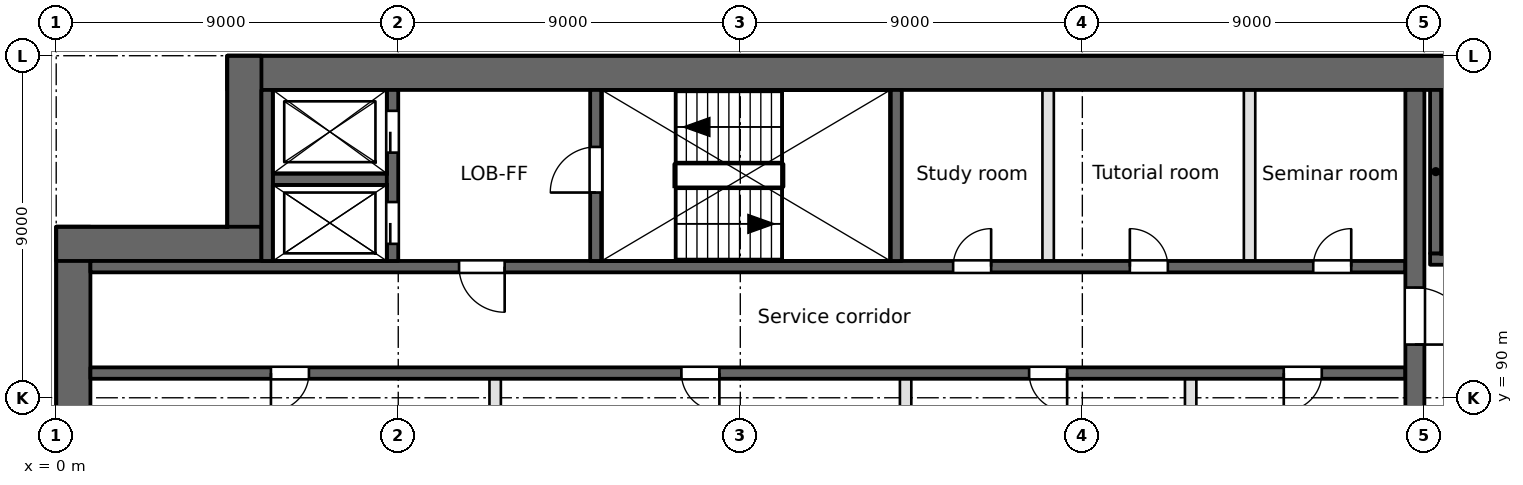
"""IFC4 building model, lengths in metres.
Left out: names, types, materials, properties, quantities, classifications, styles, units other than length and angle.
Written with IfcOpenShell. Run it as: python <this file> out.ifc"""

import sys

from ifc_helpers import new_model, si_unit, direction, frame, frame_2d, origin, place, context, subcontext, project, spatial, rectangle, extrude, element, fill, save


model = new_model("IFC4")
c1 = context("Model", 3, precision=1e-05, world=origin(), true_north=direction((0.0, 1.0)))
c2 = subcontext(c1, "Body", "Model", "MODEL_VIEW")
j1 = project(units=[si_unit("LENGTHUNIT", "METRE"), si_unit("PLANEANGLEUNIT", "RADIAN")], contexts=[c1])
p1 = place(None, origin())
s1 = spatial("IfcSite", under=j1, at=p1, CompositionType="ELEMENT")
p2 = place(p1, origin())
s2 = spatial("IfcBuilding", under=s1, at=p2, CompositionType="ELEMENT")
p3 = place(p2, frame((0.0, 0.0, 58.0)))
s3 = spatial("IfcBuildingStorey", under=s2, at=p3, CompositionType="ELEMENT", Elevation=58.0)
p4 = place(p3, frame((0.45, 94.5, 0.0), z_axis=(0.0, 0.0, 1.0), x_axis=(0.0, -1.0, 0.0)))
e1 = element("IfcWall", 1, at=p4, inside=s3, PredefinedType="SHEAR", context=c2, shape_type="SweptSolid", body=[
    extrude(rectangle(XDim=66.187, YDim=0.9, at=frame_2d((33.094, 0.0))), origin(), (0.0, 0.0, 1.0), 3.7),
])
p5 = place(p3, frame((94.5, 98.55, 0.0), z_axis=(0.0, 0.0, 1.0), x_axis=(-1.0, 0.0, 0.0)))
e2 = element("IfcWall", 2, at=p5, inside=s3, PredefinedType="SHEAR", context=c2, shape_type="SweptSolid", body=[
    extrude(rectangle(XDim=90.0, YDim=0.9, at=frame_2d((45.0, 0.0))), origin(), (0.0, 0.0, 1.0), 3.7),
])
for number, where, z_axis, x_axis in (
    (3, (4.95, 99.0, 0.0), (0.0, 0.0, 1.0), (0.0, -1.0, 0.0)),
    (4, (5.4, 94.05, 0.0), (0.0, 0.0, 1.0), (-1.0, 0.0, 0.0)),
):
    element("IfcWall", number, at=place(p3, frame(where, z_axis=z_axis, x_axis=x_axis)), inside=s3, PredefinedType="SHEAR", context=c2, shape_type="SweptSolid", body=[
        extrude(rectangle(XDim=5.4, YDim=0.9, at=frame_2d((2.7, 0.0))), origin(), (0.0, 0.0, 1.0), 3.7),
    ])
p6 = place(p3, frame((0.9, 90.65, -0.4), z_axis=(0.0, 0.0, 1.0), x_axis=(1.0, 0.0, 0.0)))
e5 = element("IfcWall", 5, at=p6, inside=s3, PredefinedType="SOLIDWALL", context=c2, shape_type="SweptSolid", body=[
    extrude(rectangle(XDim=34.6, YDim=0.3, at=frame_2d((17.3, 0.0))), origin(), (0.0, 0.0, 1.0), 3.7),
])
p7 = place(p6, frame((4.75, 0.0, 0.4)))
e6 = element("IfcOpeningElement", 6, at=p7, cuts=e5, PredefinedType="OPENING", context=c2, shape_type="SweptSolid", body=[
    extrude(rectangle(XDim=1.0, YDim=2.1, at=frame_2d((0.5, 1.05))), frame((0.0, 0.15, 0.0), z_axis=(0.0, -1.0, 0.0), x_axis=(1.0, 0.0, 0.0)), (0.0, 0.0, 1.0), 0.3),
])
p8 = place(p6, frame((24.7, 0.0, 0.4)))
e7 = element("IfcOpeningElement", 7, at=p8, cuts=e5, PredefinedType="OPENING", context=c2, shape_type="SweptSolid", body=[
    extrude(rectangle(XDim=1.0, YDim=2.1, at=frame_2d((0.5, 1.05))), frame((0.0, 0.15, 0.0), z_axis=(0.0, -1.0, 0.0), x_axis=(1.0, 0.0, 0.0)), (0.0, 0.0, 1.0), 0.3),
])
p9 = place(p6, frame((15.55, 0.0, 0.4)))
e8 = element("IfcOpeningElement", 8, at=p9, cuts=e5, PredefinedType="OPENING", context=c2, shape_type="SweptSolid", body=[
    extrude(rectangle(XDim=1.0, YDim=2.1, at=frame_2d((0.5, 1.05))), frame((0.0, 0.15, 0.0), z_axis=(0.0, -1.0, 0.0), x_axis=(1.0, 0.0, 0.0)), (0.0, 0.0, 1.0), 0.3),
])
p10 = place(p6, frame((31.4, 0.0, 0.4)))
e9 = element("IfcOpeningElement", 9, at=p10, cuts=e5, PredefinedType="OPENING", context=c2, shape_type="SweptSolid", body=[
    extrude(rectangle(XDim=1.0, YDim=2.1, at=frame_2d((0.5, 1.05))), frame((0.0, 0.15, 0.0), z_axis=(0.0, -1.0, 0.0), x_axis=(1.0, 0.0, 0.0)), (0.0, 0.0, 1.0), 0.3),
])
p11 = place(p3, frame((0.9, 93.45, -0.4), z_axis=(0.0, 0.0, 1.0), x_axis=(1.0, 0.0, 0.0)))
e10 = element("IfcWall", 10, at=p11, inside=s3, PredefinedType="SOLIDWALL", context=c2, shape_type="SweptSolid", body=[
    extrude(rectangle(XDim=34.6, YDim=0.3, at=frame_2d((17.3, 0.0))), origin(), (0.0, 0.0, 1.0), 3.7),
])
p12 = place(p11, frame((9.7, 0.0, 0.4)))
e11 = element("IfcOpeningElement", 11, at=p12, cuts=e10, PredefinedType="OPENING", context=c2, shape_type="SweptSolid", body=[
    extrude(rectangle(XDim=1.2, YDim=2.1, at=frame_2d((0.6, 1.05))), frame((0.0, 0.15, 0.0), z_axis=(0.0, -1.0, 0.0), x_axis=(1.0, 0.0, 0.0)), (0.0, 0.0, 1.0), 0.3),
])
p13 = place(p11, frame((22.7, 0.0, 0.4)))
e12 = element("IfcOpeningElement", 12, at=p13, cuts=e10, PredefinedType="OPENING", context=c2, shape_type="SweptSolid", body=[
    extrude(rectangle(XDim=1.0, YDim=2.1, at=frame_2d((0.5, 1.05))), frame((0.0, 0.15, 0.0), z_axis=(0.0, -1.0, 0.0), x_axis=(1.0, 0.0, 0.0)), (0.0, 0.0, 1.0), 0.3),
])
p14 = place(p11, frame((27.35, 0.0, 0.4)))
e13 = element("IfcOpeningElement", 13, at=p14, cuts=e10, PredefinedType="OPENING", context=c2, shape_type="SweptSolid", body=[
    extrude(rectangle(XDim=1.0, YDim=2.1, at=frame_2d((0.5, 1.05))), frame((0.0, 0.15, 0.0), z_axis=(0.0, -1.0, 0.0), x_axis=(1.0, 0.0, 0.0)), (0.0, 0.0, 1.0), 0.3),
])
p15 = place(p11, frame((32.175, 0.0, 0.4)))
e14 = element("IfcOpeningElement", 14, at=p15, cuts=e10, PredefinedType="OPENING", context=c2, shape_type="SweptSolid", body=[
    extrude(rectangle(XDim=1.0, YDim=2.1, at=frame_2d((0.5, 1.05))), frame((0.0, 0.15, 0.0), z_axis=(0.0, -1.0, 0.0), x_axis=(1.0, 0.0, 0.0)), (0.0, 0.0, 1.0), 0.3),
])
p16 = place(p3, frame((36.15, 93.65, -0.4), z_axis=(0.0, 0.0, 1.0), x_axis=(1.0, 0.0, 0.0)))
e15 = element("IfcWall", 15, at=p16, inside=s3, PredefinedType="SOLIDWALL", context=c2, shape_type="SweptSolid", body=[
    extrude(rectangle(XDim=8.2, YDim=0.3, at=frame_2d((4.1, 0.0))), origin(), (0.0, 0.0, 1.0), 3.7),
])
p17 = place(p16, frame((0.7, 0.0, 0.4)))
e16 = element("IfcOpeningElement", 16, at=p17, cuts=e15, PredefinedType="OPENING", context=c2, shape_type="SweptSolid", body=[
    extrude(rectangle(XDim=1.2, YDim=2.1, at=frame_2d((0.6, 1.05))), frame((0.0, 0.15, 0.0), z_axis=(0.0, -1.0, 0.0), x_axis=(1.0, 0.0, 0.0)), (0.0, 0.0, 1.0), 0.3),
])
p18 = place(p3, frame((5.7, 95.75, -0.4), z_axis=(0.0, 0.0, 1.0), x_axis=(1.0, 0.0, 0.0)))
e17 = element("IfcWall", 17, at=p18, inside=s3, PredefinedType="SOLIDWALL", context=c2, shape_type="SweptSolid", body=[
    extrude(rectangle(XDim=3.0, YDim=0.3, at=frame_2d((1.5, 0.0))), origin(), (0.0, 0.0, 1.0), 3.7),
])
p19 = place(p3, frame((5.55, 93.6, -0.4), z_axis=(0.0, 0.0, 1.0), x_axis=(0.0, 1.0, 0.0)))
e18 = element("IfcWall", 18, at=p19, inside=s3, PredefinedType="SOLIDWALL", context=c2, shape_type="SweptSolid", body=[
    extrude(rectangle(XDim=4.5, YDim=0.3, at=frame_2d((2.25, 0.0))), origin(), (0.0, 0.0, 1.0), 3.7),
])
p20 = place(p3, frame((8.85, 93.6, -0.4), z_axis=(0.0, 0.0, 1.0), x_axis=(0.0, 1.0, 0.0)))
e19 = element("IfcWall", 19, at=p20, inside=s3, PredefinedType="SOLIDWALL", context=c2, shape_type="SweptSolid", body=[
    extrude(rectangle(XDim=4.5, YDim=0.3, at=frame_2d((2.25, 0.0))), origin(), (0.0, 0.0, 1.0), 3.7),
])
p21 = place(p20, frame((0.45, 0.0, 0.4)))
e20 = element("IfcOpeningElement", 20, at=p21, cuts=e19, PredefinedType="OPENING", context=c2, shape_type="SweptSolid", body=[
    extrude(rectangle(XDim=1.1, YDim=2.1, at=frame_2d((0.55, 1.05))), frame((0.0, 0.15, 0.0), z_axis=(0.0, -1.0, 0.0), x_axis=(1.0, 0.0, 0.0)), (0.0, 0.0, 1.0), 0.3),
])
p22 = place(p20, frame((2.85, 0.0, 0.4)))
e21 = element("IfcOpeningElement", 21, at=p22, cuts=e19, PredefinedType="OPENING", context=c2, shape_type="SweptSolid", body=[
    extrude(rectangle(XDim=1.1, YDim=2.1, at=frame_2d((0.55, 1.05))), frame((0.0, 0.15, 0.0), z_axis=(0.0, -1.0, 0.0), x_axis=(1.0, 0.0, 0.0)), (0.0, 0.0, 1.0), 0.3),
])
p23 = place(p3, frame((11.55, 87.95, 0.0), z_axis=(0.0, 0.0, 1.0), x_axis=(0.0, 1.0, 0.0)))
e22 = element("IfcWall", 22, at=p23, inside=s3, PredefinedType="PARTITIONING", context=c2, shape_type="SweptSolid", body=[
    extrude(rectangle(XDim=2.55, YDim=0.3, at=frame_2d((1.275, 0.0))), origin(), (0.0, 0.0, 1.0), 3.3),
])
p24 = place(p3, frame((14.2, 93.6, -0.4), z_axis=(0.0, 0.0, 1.0), x_axis=(0.0, 1.0, 0.0)))
e23 = element("IfcWall", 23, at=p24, inside=s3, PredefinedType="SOLIDWALL", context=c2, shape_type="SweptSolid", body=[
    extrude(rectangle(XDim=4.5, YDim=0.3, at=frame_2d((2.25, 0.0))), origin(), (0.0, 0.0, 1.0), 3.7),
])
p25 = place(p24, frame((1.8, 0.0, 0.4)))
e24 = element("IfcOpeningElement", 24, at=p25, cuts=e23, PredefinedType="OPENING", context=c2, shape_type="SweptSolid", body=[
    extrude(rectangle(XDim=1.2, YDim=2.1, at=frame_2d((0.6, 1.05))), frame((0.0, 0.15, 0.0), z_axis=(0.0, -1.0, 0.0), x_axis=(1.0, 0.0, 0.0)), (0.0, 0.0, 1.0), 0.3),
])
p26 = place(p3, frame((22.1, 93.6, -0.4), z_axis=(0.0, 0.0, 1.0), x_axis=(0.0, 1.0, 0.0)))
e25 = element("IfcWall", 25, at=p26, inside=s3, PredefinedType="SOLIDWALL", context=c2, shape_type="SweptSolid", body=[
    extrude(rectangle(XDim=4.5, YDim=0.3, at=frame_2d((2.25, 0.0))), origin(), (0.0, 0.0, 1.0), 3.7),
])
p27 = place(p3, frame((22.35, 87.95, 0.0), z_axis=(0.0, 0.0, 1.0), x_axis=(0.0, 1.0, 0.0)))
e26 = element("IfcWall", 26, at=p27, inside=s3, PredefinedType="PARTITIONING", context=c2, shape_type="SweptSolid", body=[
    extrude(rectangle(XDim=2.55, YDim=0.3, at=frame_2d((1.275, 0.0))), origin(), (0.0, 0.0, 1.0), 3.3),
])
p28 = place(p3, frame((26.1, 93.6, 0.0), z_axis=(0.0, 0.0, 1.0), x_axis=(0.0, 1.0, 0.0)))
e27 = element("IfcWall", 27, at=p28, inside=s3, PredefinedType="PARTITIONING", context=c2, shape_type="SweptSolid", body=[
    extrude(rectangle(XDim=4.5, YDim=0.3, at=frame_2d((2.25, 0.0))), origin(), (0.0, 0.0, 1.0), 3.3),
])
p29 = place(p3, frame((29.85, 87.95, 0.0), z_axis=(0.0, 0.0, 1.0), x_axis=(0.0, 1.0, 0.0)))
e28 = element("IfcWall", 28, at=p29, inside=s3, PredefinedType="PARTITIONING", context=c2, shape_type="SweptSolid", body=[
    extrude(rectangle(XDim=2.55, YDim=0.3, at=frame_2d((1.275, 0.0))), origin(), (0.0, 0.0, 1.0), 3.3),
])
p30 = place(p3, frame((31.4, 93.6, 0.0), z_axis=(0.0, 0.0, 1.0), x_axis=(0.0, 1.0, 0.0)))
e29 = element("IfcWall", 29, at=p30, inside=s3, PredefinedType="PARTITIONING", context=c2, shape_type="SweptSolid", body=[
    extrude(rectangle(XDim=4.5, YDim=0.3, at=frame_2d((2.25, 0.0))), origin(), (0.0, 0.0, 1.0), 3.3),
])
p31 = place(p3, frame((35.75, 63.5, -0.4), z_axis=(0.0, 0.0, 1.0), x_axis=(0.0, 1.0, 0.0)))
e30 = element("IfcWall", 30, at=p31, inside=s3, PredefinedType="SOLIDWALL", context=c2, shape_type="SweptSolid", body=[
    extrude(rectangle(XDim=34.6, YDim=0.5, at=frame_2d((17.3, 0.0))), origin(), (0.0, 0.0, 1.0), 3.7),
])
p32 = place(p31, frame((9.7, 0.0, 0.4)))
e31 = element("IfcOpeningElement", 31, at=p32, cuts=e30, PredefinedType="OPENING", context=c2, shape_type="SweptSolid", body=[
    extrude(rectangle(XDim=2.4, YDim=2.1, at=frame_2d((1.2, 1.05))), frame((0.0, 0.25, 0.0), z_axis=(0.0, -1.0, 0.0), x_axis=(1.0, 0.0, 0.0)), (0.0, 0.0, 1.0), 0.5),
])
p33 = place(p31, frame((27.9, 0.0, 0.4)))
e32 = element("IfcOpeningElement", 32, at=p33, cuts=e30, PredefinedType="OPENING", context=c2, shape_type="SweptSolid", body=[
    extrude(rectangle(XDim=1.5, YDim=2.1, at=frame_2d((0.75, 1.05))), frame((0.0, 0.25, 0.0), z_axis=(0.0, -1.0, 0.0), x_axis=(1.0, 0.0, 0.0)), (0.0, 0.0, 1.0), 0.5),
])
p34 = place(p31, frame((1.5, 0.0, 0.4)))
e33 = element("IfcOpeningElement", 33, at=p34, cuts=e30, PredefinedType="OPENING", context=c2, shape_type="SweptSolid", body=[
    extrude(rectangle(XDim=1.2, YDim=2.1, at=frame_2d((0.6, 1.05))), frame((0.0, 0.25, 0.0), z_axis=(0.0, -1.0, 0.0), x_axis=(1.0, 0.0, 0.0)), (0.0, 0.0, 1.0), 0.5),
])
p35 = place(p3, frame((36.3, 93.8, -0.4), z_axis=(0.0, 0.0, 1.0), x_axis=(0.0, 1.0, 0.0)))
e34 = element("IfcWall", 34, at=p35, inside=s3, PredefinedType="SOLIDWALL", context=c2, shape_type="SweptSolid", body=[
    extrude(rectangle(XDim=4.3, YDim=0.3, at=frame_2d((2.15, 0.0))), origin(), (0.0, 0.0, 1.0), 3.7),
])
p36 = place(p21, origin())
e35 = element("IfcDoor", 35, at=p36, inside=s3, OperationType="SLIDING_TO_RIGHT", PredefinedType="DOOR", context=c2, shape_type="SweptSolid", body=[
    extrude(rectangle(XDim=1.1, YDim=2.1, at=frame_2d((0.55, 1.05))), frame((0.0, 0.025, 0.0), z_axis=(0.0, -1.0, 0.0), x_axis=(1.0, 0.0, 0.0)), (0.0, 0.0, 1.0), 0.05),
])
fill(e20, e35)
p37 = place(p22, origin())
e36 = element("IfcDoor", 36, at=p37, inside=s3, OperationType="SLIDING_TO_LEFT", PredefinedType="DOOR", context=c2, shape_type="SweptSolid", body=[
    extrude(rectangle(XDim=1.1, YDim=2.1, at=frame_2d((0.55, 1.05))), frame((0.0, 0.025, 0.0), z_axis=(0.0, -1.0, 0.0), x_axis=(1.0, 0.0, 0.0)), (0.0, 0.0, 1.0), 0.05),
])
fill(e21, e36)
p38 = place(p12, frame((1.2, 0.0, 0.0), z_axis=(0.0, 0.0, 1.0), x_axis=(-1.0, 0.0, 0.0)))
e37 = element("IfcDoor", 37, at=p38, inside=s3, OperationType="SINGLE_SWING_LEFT", PredefinedType="DOOR", context=c2, shape_type="SweptSolid", body=[
    extrude(rectangle(XDim=1.2, YDim=2.1, at=frame_2d((0.6, 1.05))), frame((0.0, 0.025, 0.0), z_axis=(0.0, -1.0, 0.0), x_axis=(1.0, 0.0, 0.0)), (0.0, 0.0, 1.0), 0.05),
])
fill(e11, e37)
p39 = place(p33, frame((1.5, 0.0, 0.0), z_axis=(0.0, 0.0, 1.0), x_axis=(-1.0, 0.0, 0.0)))
e38 = element("IfcDoor", 38, at=p39, inside=s3, OperationType="SINGLE_SWING_RIGHT", PredefinedType="DOOR", context=c2, shape_type="SweptSolid", body=[
    extrude(rectangle(XDim=1.5, YDim=2.1, at=frame_2d((0.75, 1.05))), frame((0.0, 0.025, 0.0), z_axis=(0.0, -1.0, 0.0), x_axis=(1.0, 0.0, 0.0)), (0.0, 0.0, 1.0), 0.05),
])
fill(e32, e38)
p40 = place(p25, origin())
e39 = element("IfcDoor", 39, at=p40, inside=s3, OperationType="SINGLE_SWING_LEFT", PredefinedType="DOOR", context=c2, shape_type="SweptSolid", body=[
    extrude(rectangle(XDim=1.2, YDim=2.1, at=frame_2d((0.6, 1.05))), frame((0.0, 0.025, 0.0), z_axis=(0.0, -1.0, 0.0), x_axis=(1.0, 0.0, 0.0)), (0.0, 0.0, 1.0), 0.05),
])
fill(e24, e39)
p41 = place(p7, frame((1.0, 0.0, 0.0), z_axis=(0.0, 0.0, 1.0), x_axis=(-1.0, 0.0, 0.0)))
e40 = element("IfcDoor", 40, at=p41, inside=s3, OperationType="SINGLE_SWING_RIGHT", PredefinedType="DOOR", context=c2, shape_type="SweptSolid", body=[
    extrude(rectangle(XDim=1.0, YDim=2.1, at=frame_2d((0.5, 1.05))), frame((0.0, 0.025, 0.0), z_axis=(0.0, -1.0, 0.0), x_axis=(1.0, 0.0, 0.0)), (0.0, 0.0, 1.0), 0.05),
])
fill(e6, e40)
p42 = place(p8, frame((1.0, 0.0, 0.0), z_axis=(0.0, 0.0, 1.0), x_axis=(-1.0, 0.0, 0.0)))
e41 = element("IfcDoor", 41, at=p42, inside=s3, OperationType="SINGLE_SWING_LEFT", PredefinedType="DOOR", context=c2, shape_type="SweptSolid", body=[
    extrude(rectangle(XDim=1.0, YDim=2.1, at=frame_2d((0.5, 1.05))), frame((0.0, 0.025, 0.0), z_axis=(0.0, -1.0, 0.0), x_axis=(1.0, 0.0, 0.0)), (0.0, 0.0, 1.0), 0.05),
])
fill(e7, e41)
p43 = place(p9, frame((1.0, 0.0, 0.0), z_axis=(0.0, 0.0, 1.0), x_axis=(-1.0, 0.0, 0.0)))
e42 = element("IfcDoor", 42, at=p43, inside=s3, OperationType="SINGLE_SWING_LEFT", PredefinedType="DOOR", context=c2, shape_type="SweptSolid", body=[
    extrude(rectangle(XDim=1.0, YDim=2.1, at=frame_2d((0.5, 1.05))), frame((0.0, 0.025, 0.0), z_axis=(0.0, -1.0, 0.0), x_axis=(1.0, 0.0, 0.0)), (0.0, 0.0, 1.0), 0.05),
])
fill(e8, e42)
p44 = place(p10, frame((1.0, 0.0, 0.0), z_axis=(0.0, 0.0, 1.0), x_axis=(-1.0, 0.0, 0.0)))
e43 = element("IfcDoor", 43, at=p44, inside=s3, OperationType="SINGLE_SWING_RIGHT", PredefinedType="DOOR", context=c2, shape_type="SweptSolid", body=[
    extrude(rectangle(XDim=1.0, YDim=2.1, at=frame_2d((0.5, 1.05))), frame((0.0, 0.025, 0.0), z_axis=(0.0, -1.0, 0.0), x_axis=(1.0, 0.0, 0.0)), (0.0, 0.0, 1.0), 0.05),
])
fill(e9, e43)
p45 = place(p13, origin())
e44 = element("IfcDoor", 44, at=p45, inside=s3, OperationType="SINGLE_SWING_RIGHT", PredefinedType="DOOR", context=c2, shape_type="SweptSolid", body=[
    extrude(rectangle(XDim=1.0, YDim=2.1, at=frame_2d((0.5, 1.05))), frame((0.0, 0.025, 0.0), z_axis=(0.0, -1.0, 0.0), x_axis=(1.0, 0.0, 0.0)), (0.0, 0.0, 1.0), 0.05),
])
fill(e12, e44)
p46 = place(p14, origin())
e45 = element("IfcDoor", 45, at=p46, inside=s3, OperationType="SINGLE_SWING_LEFT", PredefinedType="DOOR", context=c2, shape_type="SweptSolid", body=[
    extrude(rectangle(XDim=1.0, YDim=2.1, at=frame_2d((0.5, 1.05))), frame((0.0, 0.025, 0.0), z_axis=(0.0, -1.0, 0.0), x_axis=(1.0, 0.0, 0.0)), (0.0, 0.0, 1.0), 0.05),
])
fill(e13, e45)
p47 = place(p15, origin())
e46 = element("IfcDoor", 46, at=p47, inside=s3, OperationType="SINGLE_SWING_RIGHT", PredefinedType="DOOR", context=c2, shape_type="SweptSolid", body=[
    extrude(rectangle(XDim=1.0, YDim=2.1, at=frame_2d((0.5, 1.05))), frame((0.0, 0.025, 0.0), z_axis=(0.0, -1.0, 0.0), x_axis=(1.0, 0.0, 0.0)), (0.0, 0.0, 1.0), 0.05),
])
fill(e14, e46)
save(model, sys.argv[1])
